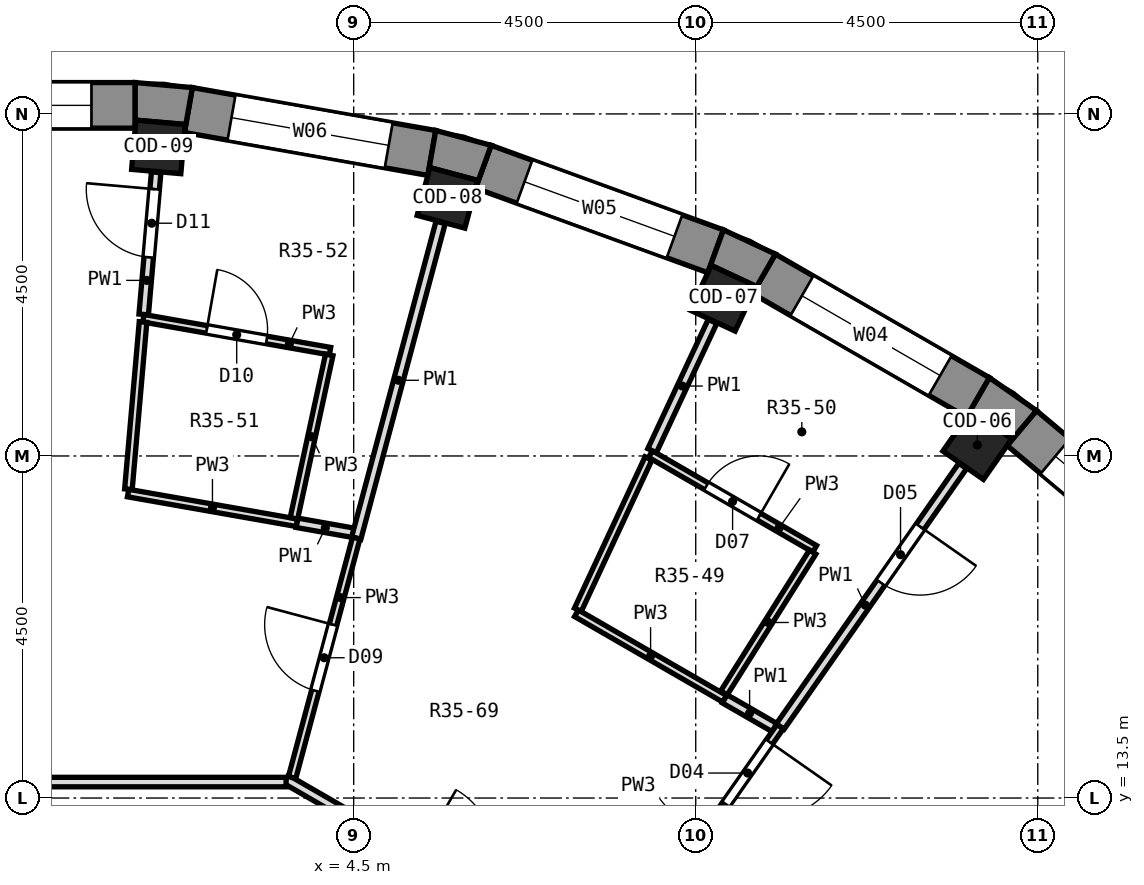
"""IFC4 building model, lengths in metres.
Left out: names, types, materials, properties, quantities, classifications, styles, units other than length and angle.
Written with IfcOpenShell. Run it as: python <this file> out.ifc"""

import sys

from ifc_helpers import new_model, si_unit, direction, frame, frame_2d, origin, origin_2d, place, context, subcontext, project, spatial, polyline, rectangle, outline, extrude, element, fill, save


model = new_model("IFC4")
c1 = context("Model", 3, precision=1e-05, world=origin(), true_north=direction((0.0, 1.0)))
c2 = subcontext(c1, "Body", "Model", "MODEL_VIEW")
j1 = project(units=[si_unit("LENGTHUNIT", "METRE"), si_unit("PLANEANGLEUNIT", "RADIAN")], contexts=[c1])
p1 = place(None, origin())
s1 = spatial("IfcSite", under=j1, at=p1, CompositionType="ELEMENT")
p2 = place(p1, origin())
s2 = spatial("IfcBuilding", under=s1, at=p2, CompositionType="ELEMENT")
p3 = place(p2, frame((0.0, 0.0, 249.5)))
s3 = spatial("IfcBuildingStorey", under=s2, at=p3, CompositionType="ELEMENT", Elevation=249.5)
for number, where, z_axis, x_axis in (
    (1, (12.705, 18.144, 0.0), (0.0, 0.0, 1.0), (0.574, 0.819, 0.0)),
    (2, (9.361, 20.075, 0.0), (0.0, 0.0, 1.0), (0.423, 0.906, 0.0)),
    (3, (5.733, 21.395, 0.0), (0.0, 0.0, 1.0), (0.259, 0.966, 0.0)),
    (4, (1.93, 22.066, 0.0), (0.0, 0.0, 1.0), (0.087, 0.996, 0.0)),
):
    element("IfcColumn", number, at=place(p3, frame(where, z_axis=z_axis, x_axis=x_axis)), inside=s3, PredefinedType="COLUMN", context=c2, shape_type="SweptSolid", body=[
        extrude(rectangle(XDim=0.65, YDim=0.65, at=origin_2d()), origin(), (0.0, 0.0, 1.0), 3.3),
    ])
p4 = place(p3, frame((15.781, 16.277, 0.0), z_axis=(0.0, 0.0, 1.0), x_axis=(-0.766056773982, 0.64277291405, 0.0)))
e5 = element("IfcWall", 5, at=p4, inside=s3, PredefinedType="SOLIDWALL", context=c2, shape_type="SweptSolid", body=[
    extrude(rectangle(XDim=3.252, YDim=0.6, at=frame_2d((1.626, 0.0))), origin(), (0.0, 0.0, 1.0), 2.9),
])
p5 = place(p4, frame((0.576, 0.0, 0.9)))
e6 = element("IfcOpeningElement", 6, at=p5, cuts=e5, PredefinedType="OPENING", context=c2, shape_type="SweptSolid", body=[
    extrude(rectangle(XDim=2.1, YDim=1.8, at=frame_2d((1.05, 0.9))), frame((0.0, 0.312, 0.0), z_axis=(0.0, -1.0, 0.0), x_axis=(1.0, 0.0, 0.0)), (0.0, 0.0, 1.0), 0.624),
])
p6 = place(p3, frame((12.714, 18.77, 0.0), z_axis=(0.0, 0.0, 1.0), x_axis=(-0.866016800201, 0.500014901547, 0.0)))
e7 = element("IfcWall", 7, at=p6, inside=s3, PredefinedType="SOLIDWALL", context=c2, shape_type="SweptSolid", body=[
    extrude(rectangle(XDim=3.252, YDim=0.6, at=frame_2d((1.626, 0.0))), origin(), (0.0, 0.0, 1.0), 2.9),
])
p7 = place(p6, frame((0.576, 0.0, 0.9)))
e8 = element("IfcOpeningElement", 8, at=p7, cuts=e7, PredefinedType="OPENING", context=c2, shape_type="SweptSolid", body=[
    extrude(rectangle(XDim=2.1, YDim=1.8, at=frame_2d((1.05, 0.9))), frame((0.0, 0.312, 0.0), z_axis=(0.0, -1.0, 0.0), x_axis=(1.0, 0.0, 0.0)), (0.0, 0.0, 1.0), 0.624),
])
p8 = place(p3, frame((9.262, 20.693, 0.0), z_axis=(0.0, 0.0, 1.0), x_axis=(-0.939679383794, 0.342056509473, 0.0)))
e9 = element("IfcWall", 9, at=p8, inside=s3, PredefinedType="SOLIDWALL", context=c2, shape_type="SweptSolid", body=[
    extrude(rectangle(XDim=3.252, YDim=0.6, at=frame_2d((1.626, 0.0))), origin(), (0.0, 0.0, 1.0), 2.9),
])
p9 = place(p8, frame((0.576, 0.0, 0.9)))
e10 = element("IfcOpeningElement", 10, at=p9, cuts=e9, PredefinedType="OPENING", context=c2, shape_type="SweptSolid", body=[
    extrude(rectangle(XDim=2.1, YDim=1.8, at=frame_2d((1.05, 0.9))), frame((0.0, 0.312, 0.0), z_axis=(0.0, -1.0, 0.0), x_axis=(1.0, 0.0, 0.0)), (0.0, 0.0, 1.0), 0.624),
])
p10 = place(p3, frame((5.528, 21.987, 0.0), z_axis=(0.0, 0.0, 1.0), x_axis=(-0.984806225186, 0.173656842178, 0.0)))
e11 = element("IfcWall", 11, at=p10, inside=s3, PredefinedType="SOLIDWALL", context=c2, shape_type="SweptSolid", body=[
    extrude(rectangle(XDim=3.252, YDim=0.6, at=frame_2d((1.626, 0.0))), origin(), (0.0, 0.0, 1.0), 2.9),
])
p11 = place(p10, frame((0.576, 0.0, 0.9)))
e12 = element("IfcOpeningElement", 12, at=p11, cuts=e11, PredefinedType="OPENING", context=c2, shape_type="SweptSolid", body=[
    extrude(rectangle(XDim=2.1, YDim=1.8, at=frame_2d((1.05, 0.9))), frame((0.0, 0.312, 0.0), z_axis=(0.0, -1.0, 0.0), x_axis=(1.0, 0.0, 0.0)), (0.0, 0.0, 1.0), 0.624),
])
p12 = place(p3, frame((1.626, 22.613, 0.0), z_axis=(0.0, 0.0, 1.0), x_axis=(-1.0, 0.0, 0.0)))
e13 = element("IfcWall", 13, at=p12, inside=s3, PredefinedType="SOLIDWALL", context=c2, shape_type="SweptSolid", body=[
    extrude(rectangle(XDim=3.251, YDim=0.6, at=frame_2d((1.626, 0.0))), origin(), (0.0, 0.0, 1.0), 2.9),
])
p13 = place(p12, frame((0.576, 0.0, 0.9)))
e14 = element("IfcOpeningElement", 14, at=p13, cuts=e13, PredefinedType="OPENING", context=c2, shape_type="SweptSolid", body=[
    extrude(rectangle(XDim=2.1, YDim=1.8, at=frame_2d((1.05, 0.9))), frame((0.0, 0.312, 0.0), z_axis=(0.0, -1.0, 0.0), x_axis=(1.0, 0.0, 0.0)), (0.0, 0.0, 1.0), 0.624),
])
p14 = place(p3, origin())
e15 = element("IfcWall", 15, at=p14, inside=s3, PredefinedType="SOLIDWALL", context=c2, shape_type="SweptSolid", body=[
    extrude(outline(polyline([(12.864, 19.03), (12.564, 18.51), (12.625, 18.597), (13.157, 18.224), (13.097, 18.137), (13.482, 18.597), (12.864, 19.03)])), origin(), (0.0, 0.0, 1.0), 2.9),
])
p15 = place(p3, origin())
e16 = element("IfcWall", 16, at=p15, inside=s3, PredefinedType="SOLIDWALL", context=c2, shape_type="SweptSolid", body=[
    extrude(outline(polyline([(10.048, 20.656), (9.364, 20.975), (9.159, 20.411), (9.204, 20.507), (9.793, 20.232), (9.748, 20.136), (10.048, 20.656)])), origin(), (0.0, 0.0, 1.0), 2.9),
])
p16 = place(p3, origin())
e17 = element("IfcWall", 17, at=p16, inside=s3, PredefinedType="SOLIDWALL", context=c2, shape_type="SweptSolid", body=[
    extrude(outline(polyline([(5.58, 22.282), (5.476, 21.691), (5.503, 21.793), (6.131, 21.625), (6.104, 21.523), (6.309, 22.087), (5.58, 22.282)])), origin(), (0.0, 0.0, 1.0), 2.9),
])
p17 = place(p3, origin())
e18 = element("IfcWall", 18, at=p17, inside=s3, PredefinedType="SOLIDWALL", context=c2, shape_type="SweptSolid", body=[
    extrude(outline(polyline([(2.378, 22.847), (1.626, 22.913), (1.626, 22.312), (1.635, 22.418), (2.283, 22.361), (2.273, 22.256), (2.378, 22.847)])), origin(), (0.0, 0.0, 1.0), 2.9),
])
p18 = place(p3, frame((3.611, 13.747, 0.0), z_axis=(0.0, 0.0, 1.0), x_axis=(0.865964194244, -0.500106003051, 0.0)))
e19 = element("IfcWall", 19, at=p18, inside=s3, PredefinedType="PARTITIONING", context=c2, shape_type="SweptSolid", body=[
    extrude(rectangle(XDim=7.42, YDim=0.125, at=frame_2d((3.71, 0.0))), origin(), (0.0, 0.0, 1.0), 2.9),
])
p19 = place(p18, frame((2.007, 0.0, 0.0)))
e20 = element("IfcOpeningElement", 20, at=p19, cuts=e19, PredefinedType="OPENING", context=c2, shape_type="SweptSolid", body=[
    extrude(rectangle(XDim=1.0, YDim=2.1, at=frame_2d((0.5, 1.05))), frame((0.0, 0.074, 0.0), z_axis=(0.0, -1.0, 0.0), x_axis=(1.0, 0.0, 0.0)), (0.0, 0.0, 1.0), 0.149),
])
p20 = place(p3, frame((7.431, 15.931, 0.0), z_axis=(0.0, 0.0, 1.0), x_axis=(0.866046587367, -0.499963307164, 0.0)))
e21 = element("IfcWall", 21, at=p20, inside=s3, PredefinedType="PARTITIONING", context=c2, shape_type="SweptSolid", body=[
    extrude(rectangle(XDim=2.252, YDim=0.1, at=frame_2d((1.126, 0.0))), origin(), (0.0, 0.0, 1.0), 2.9),
])
p21 = place(p3, frame((9.381, 14.805, 0.0), z_axis=(0.0, 0.0, 1.0), x_axis=(0.866088799389, -0.499890179513, 0.0)))
e22 = element("IfcWall", 22, at=p21, inside=s3, PredefinedType="PARTITIONING", context=c2, shape_type="SweptSolid", body=[
    extrude(rectangle(XDim=0.756, YDim=0.125, at=frame_2d((0.378, 0.0))), origin(), (0.0, 0.0, 1.0), 2.9),
])
p22 = place(p3, frame((8.405, 18.025, 0.0), z_axis=(0.0, 0.0, 1.0), x_axis=(0.866060068719, -0.499939953764, 0.0)))
e23 = element("IfcWall", 23, at=p22, inside=s3, PredefinedType="PARTITIONING", context=c2, shape_type="SweptSolid", body=[
    extrude(rectangle(XDim=2.494, YDim=0.1, at=frame_2d((1.247, 0.0))), origin(), (0.0, 0.0, 1.0), 2.9),
])
p23 = place(p22, frame((0.847, 0.0, 0.0)))
e24 = element("IfcOpeningElement", 24, at=p23, cuts=e23, PredefinedType="OPENING", context=c2, shape_type="SweptSolid", body=[
    extrude(rectangle(XDim=0.8, YDim=2.1, at=frame_2d((0.4, 1.05))), frame((0.0, 0.062, 0.0), z_axis=(0.0, -1.0, 0.0), x_axis=(1.0, 0.0, 0.0)), (0.0, 0.0, 1.0), 0.124),
])
p24 = place(p3, frame((3.752, 17.121, 0.0), z_axis=(0.0, 0.0, 1.0), x_axis=(0.984637536595, -0.174610771512, 0.0)))
e25 = element("IfcWall", 25, at=p24, inside=s3, PredefinedType="PARTITIONING", context=c2, shape_type="SweptSolid", body=[
    extrude(rectangle(XDim=0.759, YDim=0.125, at=frame_2d((0.38, 0.0))), origin(), (0.0, 0.0, 1.0), 2.9),
])
p25 = place(p3, frame((1.532, 17.512, 0.0), z_axis=(0.0, 0.0, 1.0), x_axis=(0.984872829854, -0.173278703295, 0.0)))
e26 = element("IfcWall", 26, at=p25, inside=s3, PredefinedType="PARTITIONING", context=c2, shape_type="SweptSolid", body=[
    extrude(rectangle(XDim=2.254, YDim=0.1, at=frame_2d((1.127, 0.0))), origin(), (0.0, 0.0, 1.0), 2.9),
])
p26 = place(p3, frame((1.733, 19.812, 0.0), z_axis=(0.0, 0.0, 1.0), x_axis=(0.984805232191, -0.17366247335, 0.0)))
e27 = element("IfcWall", 27, at=p26, inside=s3, PredefinedType="PARTITIONING", context=c2, shape_type="SweptSolid", body=[
    extrude(rectangle(XDim=2.494, YDim=0.1, at=frame_2d((1.247, 0.0))), origin(), (0.0, 0.0, 1.0), 2.9),
])
p27 = place(p26, frame((0.847, 0.0, 0.0)))
e28 = element("IfcOpeningElement", 28, at=p27, cuts=e27, PredefinedType="OPENING", context=c2, shape_type="SweptSolid", body=[
    extrude(rectangle(XDim=0.8, YDim=2.1, at=frame_2d((0.4, 1.05))), frame((0.0, 0.062, 0.0), z_axis=(0.0, -1.0, 0.0), x_axis=(1.0, 0.0, 0.0)), (0.0, 0.0, 1.0), 0.124),
])
p28 = place(p3, frame((-3.746, 13.71, 0.0), z_axis=(0.0, 0.0, 1.0), x_axis=(1.0, 0.0, 0.0)))
e29 = element("IfcWall", 29, at=p28, inside=s3, PredefinedType="PARTITIONING", context=c2, shape_type="SweptSolid", body=[
    extrude(rectangle(XDim=7.357, YDim=0.125, at=frame_2d((3.678, 0.0))), origin(), (0.0, 0.0, 1.0), 2.9),
])
p29 = place(p3, frame((7.93, 11.325, 0.0), z_axis=(0.0, 0.0, 1.0), x_axis=(0.57357434303, 0.819153510044, 0.0)))
e30 = element("IfcWall", 30, at=p29, inside=s3, PredefinedType="PARTITIONING", context=c2, shape_type="SweptSolid", body=[
    extrude(rectangle(XDim=3.803, YDim=0.1, at=frame_2d((1.902, 0.0))), origin(), (0.0, 0.0, 1.0), 2.9),
])
p30 = place(p29, frame((0.306, 0.0, 0.0)))
e31 = element("IfcOpeningElement", 31, at=p30, cuts=e30, PredefinedType="OPENING", context=c2, shape_type="SweptSolid", body=[
    extrude(rectangle(XDim=0.9, YDim=2.1, at=frame_2d((0.45, 1.05))), frame((0.0, 0.062, 0.0), z_axis=(0.0, -1.0, 0.0), x_axis=(1.0, 0.0, 0.0)), (0.0, 0.0, 1.0), 0.124),
])
p31 = place(p29, frame((1.406, 0.0, 0.0)))
e32 = element("IfcOpeningElement", 32, at=p31, cuts=e30, PredefinedType="OPENING", context=c2, shape_type="SweptSolid", body=[
    extrude(rectangle(XDim=0.9, YDim=2.1, at=frame_2d((0.45, 1.05))), frame((0.0, 0.062, 0.0), z_axis=(0.0, -1.0, 0.0), x_axis=(1.0, 0.0, 0.0)), (0.0, 0.0, 1.0), 0.124),
])
p32 = place(p29, frame((2.556, 0.0, 0.0)))
e33 = element("IfcOpeningElement", 33, at=p32, cuts=e30, PredefinedType="OPENING", context=c2, shape_type="SweptSolid", body=[
    extrude(rectangle(XDim=1.0, YDim=2.1, at=frame_2d((0.5, 1.05))), frame((0.0, 0.062, 0.0), z_axis=(0.0, -1.0, 0.0), x_axis=(1.0, 0.0, 0.0)), (0.0, 0.0, 1.0), 0.124),
])
p33 = place(p3, frame((10.112, 14.441, 0.0), z_axis=(0.0, 0.0, 1.0), x_axis=(0.57362673896, 0.819116819721, 0.0)))
e34 = element("IfcWall", 34, at=p33, inside=s3, PredefinedType="PARTITIONING", context=c2, shape_type="SweptSolid", body=[
    extrude(rectangle(XDim=4.186, YDim=0.125, at=frame_2d((2.093, 0.0))), origin(), (0.0, 0.0, 1.0), 2.9),
])
p34 = place(p33, frame((2.309, 0.0, 0.0)))
e35 = element("IfcOpeningElement", 35, at=p34, cuts=e34, PredefinedType="OPENING", context=c2, shape_type="SweptSolid", body=[
    extrude(rectangle(XDim=0.9, YDim=2.1, at=frame_2d((0.45, 1.05))), frame((0.0, 0.074, 0.0), z_axis=(0.0, -1.0, 0.0), x_axis=(1.0, 0.0, 0.0)), (0.0, 0.0, 1.0), 0.149),
])
p35 = place(p3, frame((9.371, 14.883, 0.0), z_axis=(0.0, 0.0, 1.0), x_axis=(0.532952249521, 0.846145318329, 0.0)))
e36 = element("IfcWall", 36, at=p35, inside=s3, PredefinedType="PARTITIONING", context=c2, shape_type="SweptSolid", body=[
    extrude(rectangle(XDim=2.19, YDim=0.1, at=frame_2d((1.095, 0.0))), origin(), (0.0, 0.0, 1.0), 2.9),
])
p36 = place(p3, frame((8.426, 18.07, 0.0), z_axis=(0.0, 0.0, 1.0), x_axis=(0.423433748068, 0.905927072671, 0.0)))
e37 = element("IfcWall", 37, at=p36, inside=s3, PredefinedType="PARTITIONING", context=c2, shape_type="SweptSolid", body=[
    extrude(rectangle(XDim=1.877, YDim=0.125, at=frame_2d((0.938, 0.0))), origin(), (0.0, 0.0, 1.0), 2.9),
])
p37 = place(p3, frame((7.45, 15.977, 0.0), z_axis=(0.0, 0.0, 1.0), x_axis=(0.422642091252, 0.906296674772, 0.0)))
e38 = element("IfcWall", 38, at=p37, inside=s3, PredefinedType="PARTITIONING", context=c2, shape_type="SweptSolid", body=[
    extrude(rectangle(XDim=2.197, YDim=0.1, at=frame_2d((1.098, 0.0))), origin(), (0.0, 0.0, 1.0), 2.9),
])
p38 = place(p3, frame((4.534, 16.92, 0.0), z_axis=(0.0, 0.0, 1.0), x_axis=(0.258154015952, 0.966103774989, 0.0)))
e39 = element("IfcWall", 39, at=p38, inside=s3, PredefinedType="PARTITIONING", context=c2, shape_type="SweptSolid", body=[
    extrude(rectangle(XDim=4.298, YDim=0.125, at=frame_2d((2.149, 0.0))), origin(), (0.0, 0.0, 1.0), 2.9),
])
p39 = place(p3, frame((3.69, 13.77, 0.0), z_axis=(0.0, 0.0, 1.0), x_axis=(0.258711132493, 0.965954734925, 0.0)))
e40 = element("IfcWall", 40, at=p39, inside=s3, PredefinedType="PARTITIONING", context=c2, shape_type="SweptSolid", body=[
    extrude(rectangle(XDim=3.26, YDim=0.1, at=frame_2d((1.63, 0.0))), origin(), (0.0, 0.0, 1.0), 2.9),
])
p40 = place(p39, frame((1.181, 0.0, 0.0)))
e41 = element("IfcOpeningElement", 41, at=p40, cuts=e40, PredefinedType="OPENING", context=c2, shape_type="SweptSolid", body=[
    extrude(rectangle(XDim=0.9, YDim=2.1, at=frame_2d((0.45, 1.05))), frame((0.0, 0.062, 0.0), z_axis=(0.0, -1.0, 0.0), x_axis=(1.0, 0.0, 0.0)), (0.0, 0.0, 1.0), 0.124),
])
p41 = place(p3, frame((3.714, 17.179, 0.0), z_axis=(0.0, 0.0, 1.0), x_axis=(0.21121821869, 0.977438931133, 0.0)))
e42 = element("IfcWall", 42, at=p41, inside=s3, PredefinedType="PARTITIONING", context=c2, shape_type="SweptSolid", body=[
    extrude(rectangle(XDim=2.201, YDim=0.1, at=frame_2d((1.1, 0.0))), origin(), (0.0, 0.0, 1.0), 2.9),
])
p42 = place(p3, frame((1.536, 17.563, 0.0), z_axis=(0.0, 0.0, 1.0), x_axis=(0.087135400637, 0.996196477587, 0.0)))
e43 = element("IfcWall", 43, at=p42, inside=s3, PredefinedType="PARTITIONING", context=c2, shape_type="SweptSolid", body=[
    extrude(rectangle(XDim=2.208, YDim=0.1, at=frame_2d((1.104, 0.0))), origin(), (0.0, 0.0, 1.0), 2.9),
])
p43 = place(p3, frame((1.737, 19.862, 0.0), z_axis=(0.0, 0.0, 1.0), x_axis=(0.08726374649, 0.996185243089, 0.0)))
e44 = element("IfcWall", 44, at=p43, inside=s3, PredefinedType="PARTITIONING", context=c2, shape_type="SweptSolid", body=[
    extrude(rectangle(XDim=1.877, YDim=0.125, at=frame_2d((0.938, 0.0))), origin(), (0.0, 0.0, 1.0), 2.9),
])
p44 = place(p43, frame((0.755, 0.0, 0.0)))
e45 = element("IfcOpeningElement", 45, at=p44, cuts=e44, PredefinedType="OPENING", context=c2, shape_type="SweptSolid", body=[
    extrude(rectangle(XDim=0.9, YDim=2.1, at=frame_2d((0.45, 1.05))), frame((0.0, 0.074, 0.0), z_axis=(0.0, -1.0, 0.0), x_axis=(1.0, 0.0, 0.0)), (0.0, 0.0, 1.0), 0.149),
])
p45 = place(p5, origin())
e46 = element("IfcWindow", 46, at=p45, inside=s3, PartitioningType="SINGLE_PANEL", PredefinedType="WINDOW", context=c2, shape_type="SweptSolid", body=[
    extrude(rectangle(XDim=2.1, YDim=1.8, at=frame_2d((1.05, 0.9))), frame((0.0, 0.18, 0.0), z_axis=(0.0, -1.0, 0.0), x_axis=(1.0, 0.0, 0.0)), (0.0, 0.0, 1.0), 0.06),
])
fill(e6, e46)
p46 = place(p7, origin())
e47 = element("IfcWindow", 47, at=p46, inside=s3, PartitioningType="SINGLE_PANEL", PredefinedType="WINDOW", context=c2, shape_type="SweptSolid", body=[
    extrude(rectangle(XDim=2.1, YDim=1.8, at=frame_2d((1.05, 0.9))), frame((0.0, 0.18, 0.0), z_axis=(0.0, -1.0, 0.0), x_axis=(1.0, 0.0, 0.0)), (0.0, 0.0, 1.0), 0.06),
])
fill(e8, e47)
p47 = place(p9, origin())
e48 = element("IfcWindow", 48, at=p47, inside=s3, PartitioningType="SINGLE_PANEL", PredefinedType="WINDOW", context=c2, shape_type="SweptSolid", body=[
    extrude(rectangle(XDim=2.1, YDim=1.8, at=frame_2d((1.05, 0.9))), frame((0.0, 0.18, 0.0), z_axis=(0.0, -1.0, 0.0), x_axis=(1.0, 0.0, 0.0)), (0.0, 0.0, 1.0), 0.06),
])
fill(e10, e48)
p48 = place(p11, origin())
e49 = element("IfcWindow", 49, at=p48, inside=s3, PartitioningType="SINGLE_PANEL", PredefinedType="WINDOW", context=c2, shape_type="SweptSolid", body=[
    extrude(rectangle(XDim=2.1, YDim=1.8, at=frame_2d((1.05, 0.9))), frame((0.0, 0.18, 0.0), z_axis=(0.0, -1.0, 0.0), x_axis=(1.0, 0.0, 0.0)), (0.0, 0.0, 1.0), 0.06),
])
fill(e12, e49)
p49 = place(p13, origin())
e50 = element("IfcWindow", 50, at=p49, inside=s3, PartitioningType="SINGLE_PANEL", PredefinedType="WINDOW", context=c2, shape_type="SweptSolid", body=[
    extrude(rectangle(XDim=2.1, YDim=1.8, at=frame_2d((1.05, 0.9))), frame((0.0, 0.18, 0.0), z_axis=(0.0, -1.0, 0.0), x_axis=(1.0, 0.0, 0.0)), (0.0, 0.0, 1.0), 0.06),
])
fill(e14, e50)
p50 = place(p32, frame((1.0, 0.0, 0.0), z_axis=(0.0, 0.0, 1.0), x_axis=(-1.0, 0.0, 0.0)))
e51 = element("IfcDoor", 51, at=p50, inside=s3, OperationType="SINGLE_SWING_LEFT", PredefinedType="DOOR", context=c2, shape_type="SweptSolid", body=[
    extrude(rectangle(XDim=1.0, YDim=2.1, at=frame_2d((0.5, 1.05))), frame((0.0, 0.025, 0.0), z_axis=(0.0, -1.0, 0.0), x_axis=(1.0, 0.0, 0.0)), (0.0, 0.0, 1.0), 0.05),
])
fill(e33, e51)
p51 = place(p34, frame((0.9, 0.0, 0.0), z_axis=(0.0, 0.0, 1.0), x_axis=(-1.0, 0.0, 0.0)))
e52 = element("IfcDoor", 52, at=p51, inside=s3, OperationType="SINGLE_SWING_LEFT", PredefinedType="DOOR", context=c2, shape_type="SweptSolid", body=[
    extrude(rectangle(XDim=0.9, YDim=2.1, at=frame_2d((0.45, 1.05))), frame((0.0, 0.025, 0.0), z_axis=(0.0, -1.0, 0.0), x_axis=(1.0, 0.0, 0.0)), (0.0, 0.0, 1.0), 0.05),
])
fill(e35, e52)
p52 = place(p23, origin())
e53 = element("IfcDoor", 53, at=p52, inside=s3, OperationType="SINGLE_SWING_RIGHT", PredefinedType="DOOR", context=c2, shape_type="SweptSolid", body=[
    extrude(rectangle(XDim=0.8, YDim=2.1, at=frame_2d((0.4, 1.05))), frame((0.0, 0.025, 0.0), z_axis=(0.0, -1.0, 0.0), x_axis=(1.0, 0.0, 0.0)), (0.0, 0.0, 1.0), 0.05),
])
fill(e24, e53)
p53 = place(p40, origin())
e54 = element("IfcDoor", 54, at=p53, inside=s3, OperationType="SINGLE_SWING_RIGHT", PredefinedType="DOOR", context=c2, shape_type="SweptSolid", body=[
    extrude(rectangle(XDim=0.9, YDim=2.1, at=frame_2d((0.45, 1.05))), frame((0.0, 0.025, 0.0), z_axis=(0.0, -1.0, 0.0), x_axis=(1.0, 0.0, 0.0)), (0.0, 0.0, 1.0), 0.05),
])
fill(e41, e54)
p54 = place(p27, origin())
e55 = element("IfcDoor", 55, at=p54, inside=s3, OperationType="SINGLE_SWING_LEFT", PredefinedType="DOOR", context=c2, shape_type="SweptSolid", body=[
    extrude(rectangle(XDim=0.8, YDim=2.1, at=frame_2d((0.4, 1.05))), frame((0.0, 0.025, 0.0), z_axis=(0.0, -1.0, 0.0), x_axis=(1.0, 0.0, 0.0)), (0.0, 0.0, 1.0), 0.05),
])
fill(e28, e55)
p55 = place(p44, origin())
e56 = element("IfcDoor", 56, at=p55, inside=s3, OperationType="SINGLE_SWING_RIGHT", PredefinedType="DOOR", context=c2, shape_type="SweptSolid", body=[
    extrude(rectangle(XDim=0.9, YDim=2.1, at=frame_2d((0.45, 1.05))), frame((0.0, 0.025, 0.0), z_axis=(0.0, -1.0, 0.0), x_axis=(1.0, 0.0, 0.0)), (0.0, 0.0, 1.0), 0.05),
])
fill(e45, e56)
save(model, sys.argv[1])
